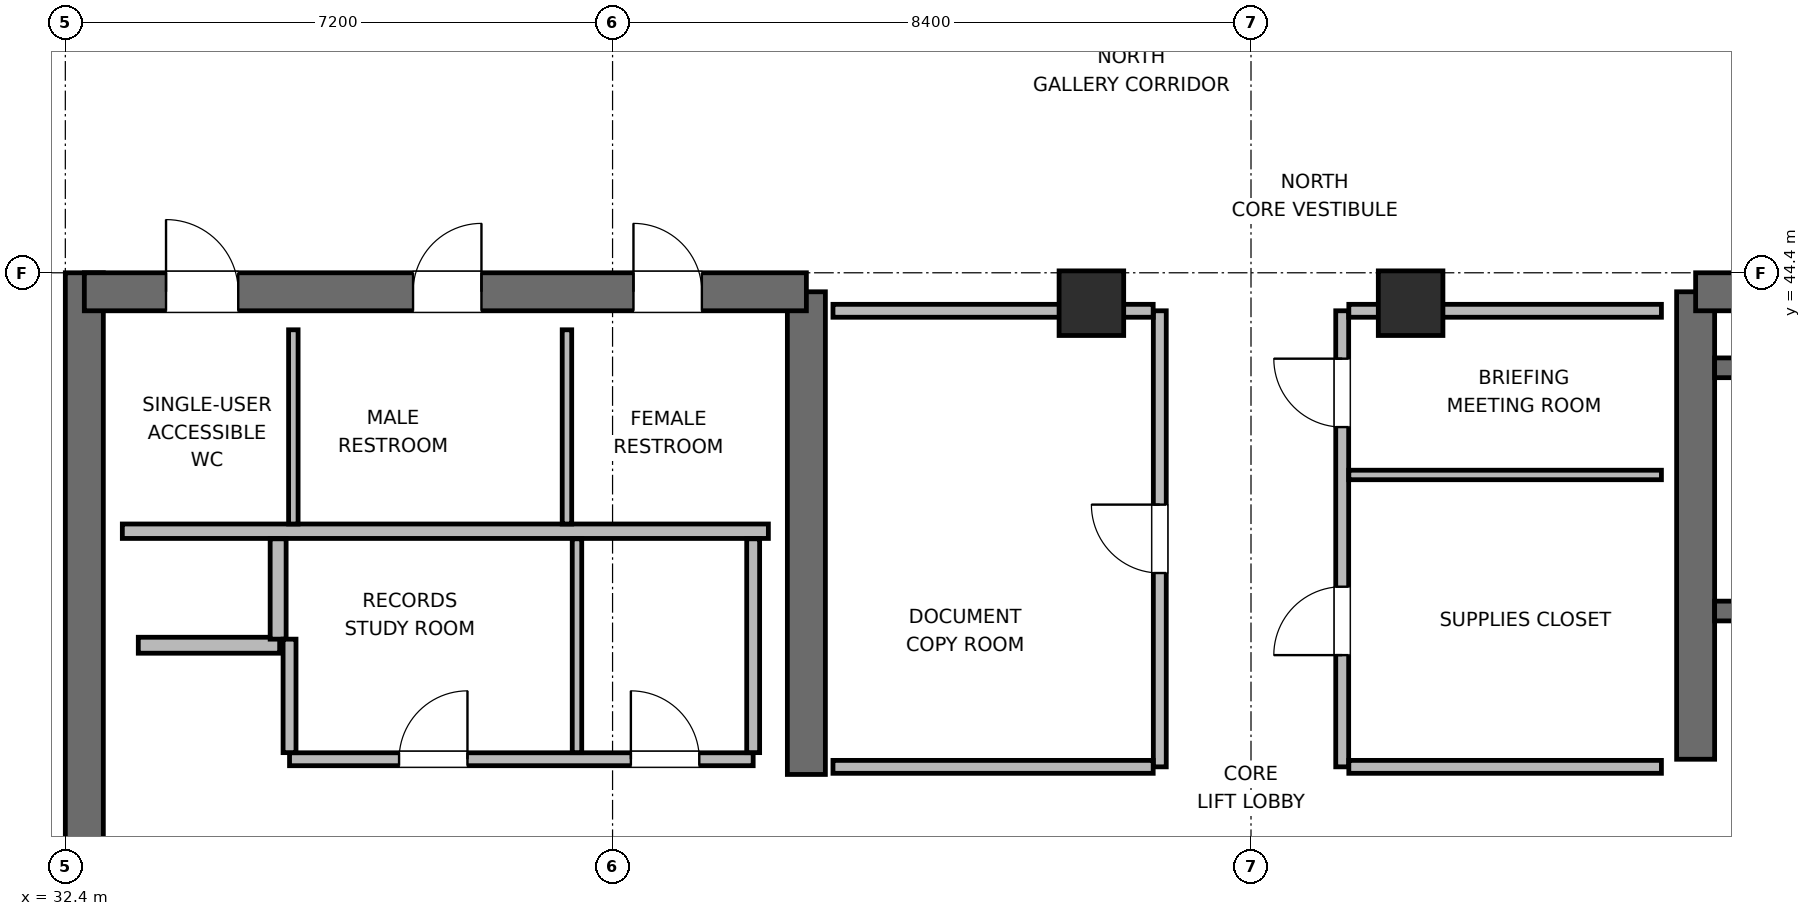
"""IFC4 building model, lengths in metres.
Left out: names, types, materials, properties, quantities, classifications, styles, units other than length and angle.
Written with IfcOpenShell. Run it as: python <this file> out.ifc"""

import sys

from ifc_helpers import new_model, si_unit, direction, frame, frame_2d, origin, origin_2d, place, context, subcontext, project, spatial, rectangle, extrude, element, fill, save


model = new_model("IFC4")
c1 = context("Model", 3, precision=1e-05, world=origin(), true_north=direction((0.0, 1.0)))
c2 = subcontext(c1, "Body", "Model", "MODEL_VIEW")
j1 = project(units=[si_unit("LENGTHUNIT", "METRE"), si_unit("PLANEANGLEUNIT", "RADIAN")], contexts=[c1])
p1 = place(None, origin())
s1 = spatial("IfcSite", under=j1, at=p1, CompositionType="ELEMENT")
p2 = place(p1, origin())
s2 = spatial("IfcBuilding", under=s1, at=p2, CompositionType="ELEMENT")
p3 = place(p2, frame((0.0, 0.0, 290.1)))
s3 = spatial("IfcBuildingStorey", under=s2, at=p3, CompositionType="ELEMENT", Elevation=290.1)
p4 = place(p3, frame((32.65, 27.6, 0.0), z_axis=(0.0, 0.0, 1.0), x_axis=(0.0, 1.0, 0.0)))
e1 = element("IfcWall", 1, at=p4, inside=s3, PredefinedType="SHEAR", context=c2, shape_type="SweptSolid", body=[
    extrude(rectangle(XDim=16.8, YDim=0.5, at=frame_2d((8.4, 0.0))), origin(), (0.0, 0.0, 1.0), 3.9),
])
p5 = place(p3, frame((42.15, 37.8, 0.0), z_axis=(0.0, 0.0, 1.0), x_axis=(0.0, 1.0, 0.0)))
e2 = element("IfcWall", 2, at=p5, inside=s3, PredefinedType="SHEAR", context=c2, shape_type="SweptSolid", body=[
    extrude(rectangle(XDim=6.35, YDim=0.5, at=frame_2d((3.175, 0.0))), origin(), (0.0, 0.0, 1.0), 3.9),
])
p6 = place(p3, frame((32.65, 44.15, 0.0), z_axis=(0.0, 0.0, 1.0), x_axis=(1.0, 0.0, 0.0)))
e3 = element("IfcWall", 3, at=p6, inside=s3, PredefinedType="SHEAR", context=c2, shape_type="SweptSolid", body=[
    extrude(rectangle(XDim=9.5, YDim=0.5, at=frame_2d((4.75, 0.0))), origin(), (0.0, 0.0, 1.0), 3.9),
])
p7 = place(p6, frame((1.075, 0.0, 0.0)))
e4 = element("IfcOpeningElement", 4, at=p7, cuts=e3, PredefinedType="OPENING", context=c2, shape_type="SweptSolid", body=[
    extrude(rectangle(XDim=0.95, YDim=2.04, at=frame_2d((0.475, 1.02))), frame((0.0, 0.26, 0.0), z_axis=(0.0, -1.0, 0.0), x_axis=(1.0, 0.0, 0.0)), (0.0, 0.0, 1.0), 0.52),
])
p8 = place(p6, frame((4.325, 0.0, 0.0)))
e5 = element("IfcOpeningElement", 5, at=p8, cuts=e3, PredefinedType="OPENING", context=c2, shape_type="SweptSolid", body=[
    extrude(rectangle(XDim=0.9, YDim=2.02, at=frame_2d((0.45, 1.01))), frame((0.0, 0.26, 0.0), z_axis=(0.0, -1.0, 0.0), x_axis=(1.0, 0.0, 0.0)), (0.0, 0.0, 1.0), 0.52),
])
p9 = place(p6, frame((7.225, 0.0, 0.0)))
e6 = element("IfcOpeningElement", 6, at=p9, cuts=e3, PredefinedType="OPENING", context=c2, shape_type="SweptSolid", body=[
    extrude(rectangle(XDim=0.9, YDim=2.02, at=frame_2d((0.45, 1.01))), frame((0.0, 0.26, 0.0), z_axis=(0.0, -1.0, 0.0), x_axis=(1.0, 0.0, 0.0)), (0.0, 0.0, 1.0), 0.52),
])
p10 = place(p3, frame((53.85, 38.0, 0.0), z_axis=(0.0, 0.0, 1.0), x_axis=(0.0, 1.0, 0.0)))
e7 = element("IfcWall", 7, at=p10, inside=s3, PredefinedType="SHEAR", context=c2, shape_type="SweptSolid", body=[
    extrude(rectangle(XDim=6.15, YDim=0.5, at=frame_2d((3.075, 0.0))), origin(), (0.0, 0.0, 1.0), 3.9),
])
p11 = place(p3, frame((53.85, 44.15, 0.0), z_axis=(0.0, 0.0, 1.0), x_axis=(1.0, 0.0, 0.0)))
e8 = element("IfcWall", 8, at=p11, inside=s3, PredefinedType="SHEAR", context=c2, shape_type="SweptSolid", body=[
    extrude(rectangle(XDim=9.5, YDim=0.5, at=frame_2d((4.75, 0.0))), origin(), (0.0, 0.0, 1.0), 3.9),
])
p12 = place(p3, frame((54.1, 39.95, 0.0), z_axis=(0.0, 0.0, 1.0), x_axis=(1.0, 0.0, 0.0)))
e9 = element("IfcWall", 9, at=p12, inside=s3, PredefinedType="SHEAR", context=c2, shape_type="SweptSolid", body=[
    extrude(rectangle(XDim=9.0, YDim=0.26, at=frame_2d((4.5, 0.0))), origin(), (0.0, 0.0, 1.0), 3.9),
])
p13 = place(p12, frame((1.1, 0.0, 0.0)))
e10 = element("IfcOpeningElement", 10, at=p13, cuts=e9, PredefinedType="OPENING", context=c2, shape_type="SweptSolid", body=[
    extrude(rectangle(XDim=1.0, YDim=2.04, at=frame_2d((0.5, 1.02))), frame((0.0, 0.14, 0.0), z_axis=(0.0, -1.0, 0.0), x_axis=(1.0, 0.0, 0.0)), (0.0, 0.0, 1.0), 0.28),
])
p14 = place(p3, frame((54.1, 43.15, 0.0), z_axis=(0.0, 0.0, 1.0), x_axis=(1.0, 0.0, 0.0)))
e11 = element("IfcWall", 11, at=p14, inside=s3, PredefinedType="SHEAR", context=c2, shape_type="SweptSolid", body=[
    extrude(rectangle(XDim=9.0, YDim=0.26, at=frame_2d((4.5, 0.0))), origin(), (0.0, 0.0, 1.0), 3.9),
])
for number, where, z_axis, x_axis in (
    (12, (45.9, 44.0, 0.0), (0.0, 0.0, 1.0), (1.0, 0.0, 0.0)),
    (13, (50.1, 44.0, 0.0), (0.0, 0.0, 1.0), (1.0, 0.0, 0.0)),
):
    element("IfcColumn", number, at=place(p3, frame(where, z_axis=z_axis, x_axis=x_axis)), inside=s3, PredefinedType="COLUMN", context=c2, shape_type="SweptSolid", body=[
        extrude(rectangle(XDim=0.85, YDim=0.85, at=origin_2d()), origin(), (0.0, 0.0, 1.0), 3.9),
    ])
p15 = place(p3, frame((33.15, 41.0, 0.0), z_axis=(0.0, 0.0, 1.0), x_axis=(1.0, 0.0, 0.0)))
e14 = element("IfcWall", 14, at=p15, inside=s3, PredefinedType="PLUMBINGWALL", context=c2, shape_type="SweptSolid", body=[
    extrude(rectangle(XDim=8.5, YDim=0.19, at=frame_2d((4.25, 0.0))), origin(), (0.0, 0.0, 1.0), 3.68),
])
for number, where, z_axis, x_axis in (
    (15, (35.4, 41.095, 0.0), (0.0, 0.0, 1.0), (0.0, 1.0, 0.0)),
    (16, (39.0, 41.095, 0.0), (0.0, 0.0, 1.0), (0.0, 1.0, 0.0)),
):
    element("IfcWall", number, at=place(p3, frame(where, z_axis=z_axis, x_axis=x_axis)), inside=s3, PredefinedType="PARTITIONING", context=c2, shape_type="SweptSolid", body=[
        extrude(rectangle(XDim=2.555, YDim=0.125, at=frame_2d((1.277, 0.0))), origin(), (0.0, 0.0, 1.0), 3.68),
    ])
p16 = place(p3, frame((33.36, 39.5, 0.0), z_axis=(0.0, 0.0, 1.0), x_axis=(1.0, 0.0, 0.0)))
e17 = element("IfcWall", 17, at=p16, inside=s3, PredefinedType="PARTITIONING", context=c2, shape_type="SweptSolid", body=[
    extrude(rectangle(XDim=1.86, YDim=0.21, at=frame_2d((0.93, 0.0))), origin(), (0.0, 0.0, 1.0), 3.68),
])
p17 = place(p3, frame((35.2, 39.58, 0.0), z_axis=(0.0, 0.0, 1.0), x_axis=(0.0, 1.0, 0.0)))
e18 = element("IfcWall", 18, at=p17, inside=s3, PredefinedType="PARTITIONING", context=c2, shape_type="SweptSolid", body=[
    extrude(rectangle(XDim=1.32, YDim=0.21, at=frame_2d((0.66, 0.0))), origin(), (0.0, 0.0, 1.0), 3.68),
])
p18 = place(p3, frame((35.35, 38.0, 0.0), z_axis=(0.0, 0.0, 1.0), x_axis=(1.0, 0.0, 0.0)))
e19 = element("IfcWall", 19, at=p18, inside=s3, PredefinedType="PARTITIONING", context=c2, shape_type="SweptSolid", body=[
    extrude(rectangle(XDim=6.1, YDim=0.17, at=frame_2d((3.05, 0.0))), origin(), (0.0, 0.0, 1.0), 3.68),
])
p19 = place(p18, frame((1.441, 0.0, 0.0)))
e20 = element("IfcOpeningElement", 20, at=p19, cuts=e19, PredefinedType="OPENING", context=c2, shape_type="SweptSolid", body=[
    extrude(rectangle(XDim=0.9, YDim=2.02, at=frame_2d((0.45, 1.01))), frame((0.0, 0.095, 0.0), z_axis=(0.0, -1.0, 0.0), x_axis=(1.0, 0.0, 0.0)), (0.0, 0.0, 1.0), 0.19),
])
p20 = place(p18, frame((4.491, 0.0, 0.0)))
e21 = element("IfcOpeningElement", 21, at=p20, cuts=e19, PredefinedType="OPENING", context=c2, shape_type="SweptSolid", body=[
    extrude(rectangle(XDim=0.9, YDim=2.02, at=frame_2d((0.45, 1.01))), frame((0.0, 0.095, 0.0), z_axis=(0.0, -1.0, 0.0), x_axis=(1.0, 0.0, 0.0)), (0.0, 0.0, 1.0), 0.19),
])
p21 = place(p3, frame((35.35, 38.087, 0.0), z_axis=(0.0, 0.0, 1.0), x_axis=(0.0, 1.0, 0.0)))
e22 = element("IfcWall", 22, at=p21, inside=s3, PredefinedType="PARTITIONING", context=c2, shape_type="SweptSolid", body=[
    extrude(rectangle(XDim=1.493, YDim=0.17, at=frame_2d((0.747, 0.0))), origin(), (0.0, 0.0, 1.0), 3.68),
])
p22 = place(p3, frame((41.45, 38.087, 0.0), z_axis=(0.0, 0.0, 1.0), x_axis=(0.0, 1.0, 0.0)))
e23 = element("IfcWall", 23, at=p22, inside=s3, PredefinedType="PARTITIONING", context=c2, shape_type="SweptSolid", body=[
    extrude(rectangle(XDim=2.813, YDim=0.17, at=frame_2d((1.406, 0.0))), origin(), (0.0, 0.0, 1.0), 3.68),
])
p23 = place(p3, frame((39.132, 38.087, 0.0), z_axis=(0.0, 0.0, 1.0), x_axis=(0.0, 1.0, 0.0)))
e24 = element("IfcWall", 24, at=p23, inside=s3, PredefinedType="PARTITIONING", context=c2, shape_type="SweptSolid", body=[
    extrude(rectangle(XDim=2.813, YDim=0.125, at=frame_2d((1.406, 0.0))), origin(), (0.0, 0.0, 1.0), 3.68),
])
p24 = place(p3, frame((46.8, 37.9, 0.0), z_axis=(0.0, 0.0, 1.0), x_axis=(0.0, 1.0, 0.0)))
e25 = element("IfcWall", 25, at=p24, inside=s3, PredefinedType="PARTITIONING", context=c2, shape_type="SweptSolid", body=[
    extrude(rectangle(XDim=6.0, YDim=0.17, at=frame_2d((3.0, 0.0))), origin(), (0.0, 0.0, 1.0), 3.68),
])
p25 = place(p24, frame((2.55, 0.0, 0.0)))
e26 = element("IfcOpeningElement", 26, at=p25, cuts=e25, PredefinedType="OPENING", context=c2, shape_type="SweptSolid", body=[
    extrude(rectangle(XDim=0.9, YDim=2.02, at=frame_2d((0.45, 1.01))), frame((0.0, 0.095, 0.0), z_axis=(0.0, -1.0, 0.0), x_axis=(1.0, 0.0, 0.0)), (0.0, 0.0, 1.0), 0.19),
])
p26 = place(p3, frame((42.5, 37.9, 0.0), z_axis=(0.0, 0.0, 1.0), x_axis=(1.0, 0.0, 0.0)))
e27 = element("IfcWall", 27, at=p26, inside=s3, PredefinedType="PARTITIONING", context=c2, shape_type="SweptSolid", body=[
    extrude(rectangle(XDim=4.213, YDim=0.17, at=frame_2d((2.106, 0.0))), origin(), (0.0, 0.0, 1.0), 3.68),
])
p27 = place(p3, frame((42.5, 43.9, 0.0), z_axis=(0.0, 0.0, 1.0), x_axis=(1.0, 0.0, 0.0)))
e28 = element("IfcWall", 28, at=p27, inside=s3, PredefinedType="PARTITIONING", context=c2, shape_type="SweptSolid", body=[
    extrude(rectangle(XDim=4.213, YDim=0.17, at=frame_2d((2.106, 0.0))), origin(), (0.0, 0.0, 1.0), 2.765),
])
p28 = place(p3, frame((49.2, 37.9, 0.0), z_axis=(0.0, 0.0, 1.0), x_axis=(0.0, 1.0, 0.0)))
e29 = element("IfcWall", 29, at=p28, inside=s3, PredefinedType="PARTITIONING", context=c2, shape_type="SweptSolid", body=[
    extrude(rectangle(XDim=6.0, YDim=0.17, at=frame_2d((3.0, 0.0))), origin(), (0.0, 0.0, 1.0), 3.68),
])
p29 = place(p28, frame((1.47, 0.0, 0.0)))
e30 = element("IfcOpeningElement", 30, at=p29, cuts=e29, PredefinedType="OPENING", context=c2, shape_type="SweptSolid", body=[
    extrude(rectangle(XDim=0.9, YDim=2.02, at=frame_2d((0.45, 1.01))), frame((0.0, 0.095, 0.0), z_axis=(0.0, -1.0, 0.0), x_axis=(1.0, 0.0, 0.0)), (0.0, 0.0, 1.0), 0.19),
])
p30 = place(p28, frame((4.47, 0.0, 0.0)))
e31 = element("IfcOpeningElement", 31, at=p30, cuts=e29, PredefinedType="OPENING", context=c2, shape_type="SweptSolid", body=[
    extrude(rectangle(XDim=0.9, YDim=2.02, at=frame_2d((0.45, 1.01))), frame((0.0, 0.095, 0.0), z_axis=(0.0, -1.0, 0.0), x_axis=(1.0, 0.0, 0.0)), (0.0, 0.0, 1.0), 0.19),
])
p31 = place(p3, frame((49.287, 37.9, 0.0), z_axis=(0.0, 0.0, 1.0), x_axis=(1.0, 0.0, 0.0)))
e32 = element("IfcWall", 32, at=p31, inside=s3, PredefinedType="PARTITIONING", context=c2, shape_type="SweptSolid", body=[
    extrude(rectangle(XDim=4.113, YDim=0.17, at=frame_2d((2.056, 0.0))), origin(), (0.0, 0.0, 1.0), 3.68),
])
p32 = place(p3, frame((49.287, 43.9, 0.0), z_axis=(0.0, 0.0, 1.0), x_axis=(1.0, 0.0, 0.0)))
e33 = element("IfcWall", 33, at=p32, inside=s3, PredefinedType="PARTITIONING", context=c2, shape_type="SweptSolid", body=[
    extrude(rectangle(XDim=4.113, YDim=0.17, at=frame_2d((2.056, 0.0))), origin(), (0.0, 0.0, 1.0), 2.765),
])
p33 = place(p3, frame((49.287, 41.74, 0.0), z_axis=(0.0, 0.0, 1.0), x_axis=(1.0, 0.0, 0.0)))
e34 = element("IfcWall", 34, at=p33, inside=s3, PredefinedType="PARTITIONING", context=c2, shape_type="SweptSolid", body=[
    extrude(rectangle(XDim=4.113, YDim=0.125, at=frame_2d((2.056, 0.0))), origin(), (0.0, 0.0, 1.0), 3.68),
])
p34 = place(p7, origin())
e35 = element("IfcDoor", 35, at=p34, inside=s3, OperationType="SINGLE_SWING_LEFT", PredefinedType="DOOR", context=c2, shape_type="SweptSolid", body=[
    extrude(rectangle(XDim=0.95, YDim=2.04, at=frame_2d((0.475, 1.02))), frame((0.0, 0.025, 0.0), z_axis=(0.0, -1.0, 0.0), x_axis=(1.0, 0.0, 0.0)), (0.0, 0.0, 1.0), 0.05),
])
fill(e4, e35)
p35 = place(p8, origin())
e36 = element("IfcDoor", 36, at=p35, inside=s3, OperationType="SINGLE_SWING_RIGHT", PredefinedType="DOOR", context=c2, shape_type="SweptSolid", body=[
    extrude(rectangle(XDim=0.9, YDim=2.02, at=frame_2d((0.45, 1.01))), frame((0.0, 0.025, 0.0), z_axis=(0.0, -1.0, 0.0), x_axis=(1.0, 0.0, 0.0)), (0.0, 0.0, 1.0), 0.05),
])
fill(e5, e36)
p36 = place(p9, origin())
e37 = element("IfcDoor", 37, at=p36, inside=s3, OperationType="SINGLE_SWING_LEFT", PredefinedType="DOOR", context=c2, shape_type="SweptSolid", body=[
    extrude(rectangle(XDim=0.9, YDim=2.02, at=frame_2d((0.45, 1.01))), frame((0.0, 0.025, 0.0), z_axis=(0.0, -1.0, 0.0), x_axis=(1.0, 0.0, 0.0)), (0.0, 0.0, 1.0), 0.05),
])
fill(e6, e37)
p37 = place(p19, origin())
e38 = element("IfcDoor", 38, at=p37, inside=s3, OperationType="SINGLE_SWING_RIGHT", PredefinedType="DOOR", context=c2, shape_type="SweptSolid", body=[
    extrude(rectangle(XDim=0.9, YDim=2.02, at=frame_2d((0.45, 1.01))), frame((0.0, 0.025, 0.0), z_axis=(0.0, -1.0, 0.0), x_axis=(1.0, 0.0, 0.0)), (0.0, 0.0, 1.0), 0.05),
])
fill(e20, e38)
p38 = place(p20, origin())
e39 = element("IfcDoor", 39, at=p38, inside=s3, OperationType="SINGLE_SWING_LEFT", PredefinedType="DOOR", context=c2, shape_type="SweptSolid", body=[
    extrude(rectangle(XDim=0.9, YDim=2.02, at=frame_2d((0.45, 1.01))), frame((0.0, 0.025, 0.0), z_axis=(0.0, -1.0, 0.0), x_axis=(1.0, 0.0, 0.0)), (0.0, 0.0, 1.0), 0.05),
])
fill(e21, e39)
p39 = place(p25, origin())
e40 = element("IfcDoor", 40, at=p39, inside=s3, OperationType="SINGLE_SWING_RIGHT", PredefinedType="DOOR", context=c2, shape_type="SweptSolid", body=[
    extrude(rectangle(XDim=0.9, YDim=2.02, at=frame_2d((0.45, 1.01))), frame((0.0, 0.025, 0.0), z_axis=(0.0, -1.0, 0.0), x_axis=(1.0, 0.0, 0.0)), (0.0, 0.0, 1.0), 0.05),
])
fill(e26, e40)
p40 = place(p29, origin())
e41 = element("IfcDoor", 41, at=p40, inside=s3, OperationType="SINGLE_SWING_LEFT", PredefinedType="DOOR", context=c2, shape_type="SweptSolid", body=[
    extrude(rectangle(XDim=0.9, YDim=2.02, at=frame_2d((0.45, 1.01))), frame((0.0, 0.025, 0.0), z_axis=(0.0, -1.0, 0.0), x_axis=(1.0, 0.0, 0.0)), (0.0, 0.0, 1.0), 0.05),
])
fill(e30, e41)
p41 = place(p30, origin())
e42 = element("IfcDoor", 42, at=p41, inside=s3, OperationType="SINGLE_SWING_RIGHT", PredefinedType="DOOR", context=c2, shape_type="SweptSolid", body=[
    extrude(rectangle(XDim=0.9, YDim=2.02, at=frame_2d((0.45, 1.01))), frame((0.0, 0.025, 0.0), z_axis=(0.0, -1.0, 0.0), x_axis=(1.0, 0.0, 0.0)), (0.0, 0.0, 1.0), 0.05),
])
fill(e31, e42)
save(model, sys.argv[1])
